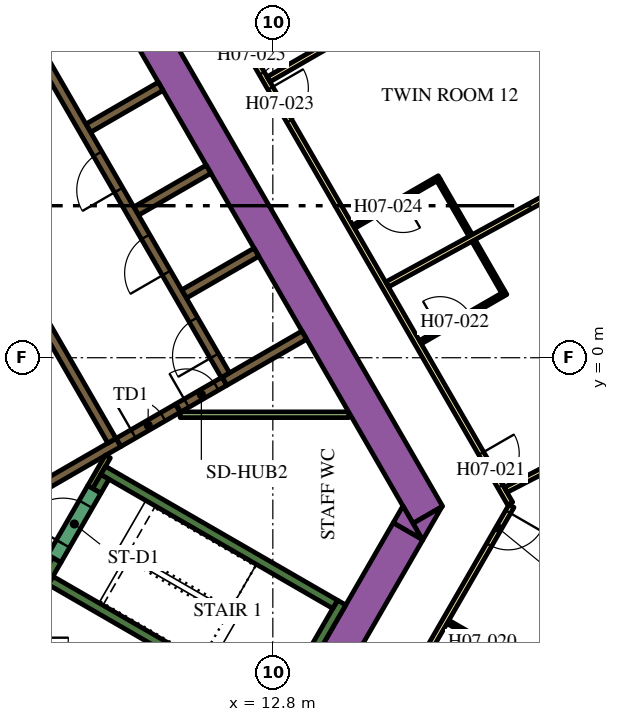
"""IFC4 building model, lengths in metres.
Left out: names, types, materials, properties, quantities, classifications, styles, units other than length and angle.
Written with IfcOpenShell. Run it as: python <this file> out.ifc"""

import sys

from ifc_helpers import new_model, si_unit, direction, frame, frame_2d, origin, place, context, subcontext, project, spatial, polyline, rectangle, outline, extrude, element, fill, save


model = new_model("IFC4")
c1 = context("Model", 3, precision=1e-05, world=origin(), true_north=direction((0.0, 1.0)))
c2 = subcontext(c1, "Body", "Model", "MODEL_VIEW")
j1 = project(units=[si_unit("LENGTHUNIT", "METRE"), si_unit("PLANEANGLEUNIT", "RADIAN")], contexts=[c1])
p1 = place(None, origin())
s1 = spatial("IfcSite", under=j1, at=p1, CompositionType="ELEMENT")
p2 = place(p1, origin())
s2 = spatial("IfcBuilding", under=s1, at=p2, CompositionType="ELEMENT")
p3 = place(p2, frame((0.0, 0.0, 99.3)))
s3 = spatial("IfcBuildingStorey", under=s2, at=p3, CompositionType="ELEMENT", Elevation=99.3)
p4 = place(p3, frame((6.776, 13.364, 0.0), z_axis=(0.0, 0.0, 1.0), x_axis=(0.500004177138, -0.8660229921, 0.0)))
e1 = element("IfcWall", 1, at=p4, inside=s3, PredefinedType="SOLIDWALL", context=c2, shape_type="SweptSolid", body=[
    extrude(rectangle(XDim=20.204, YDim=0.9, at=frame_2d((10.102, 0.0))), origin(), (0.0, 0.0, 1.0), 3.9),
])
p5 = place(p3, origin())
e2 = element("IfcWall", 2, at=p5, inside=s3, PredefinedType="SOLIDWALL", context=c2, shape_type="SweptSolid", body=[
    extrude(outline(polyline([(16.743, -4.8), (16.489, -4.36), (17.251, -3.92), (16.743, -4.8)])), origin(), (0.0, 0.0, 1.0), 3.9),
])
p6 = place(p3, frame((11.695, -12.644, 0.0), z_axis=(0.0, 0.0, 1.0), x_axis=(0.500010229568, 0.86601949766, 0.0)))
e3 = element("IfcWall", 3, at=p6, inside=s3, PredefinedType="SOLIDWALL", context=c2, shape_type="SweptSolid", body=[
    extrude(rectangle(XDim=9.326, YDim=0.9, at=frame_2d((4.663, 0.0))), origin(), (0.0, 0.0, 1.0), 3.9),
])
e4 = element("IfcWall", 4, at=p5, inside=s3, PredefinedType="SOLIDWALL", context=c2, shape_type="SweptSolid", body=[
    extrude(outline(polyline([(16.223, -3.9), (16.732, -4.78), (15.969, -4.34), (16.223, -3.9)])), origin(), (0.0, 0.0, 1.0), 3.9),
])
p7 = place(p3, frame((12.885, -9.431, 0.0), z_axis=(0.0, 0.0, 1.0), x_axis=(0.500020560727, 0.866013532718, 0.0)))
e5 = element("IfcWall", 5, at=p7, inside=s3, PredefinedType="SOLIDWALL", context=c2, shape_type="SweptSolid", body=[
    extrude(rectangle(XDim=3.45, YDim=0.25, at=frame_2d((1.725, 0.0))), origin(), (0.0, 0.0, 1.0), 3.9),
])
p8 = place(p3, frame((12.84, -9.261, 0.0), z_axis=(0.0, 0.0, 1.0), x_axis=(-0.866013990052, 0.500019768644, 0.0)))
e6 = element("IfcWall", 6, at=p8, inside=s3, PredefinedType="SOLIDWALL", context=c2, shape_type="SweptSolid", body=[
    extrude(rectangle(XDim=6.8, YDim=0.25, at=frame_2d((3.4, 0.0))), origin(), (0.0, 0.0, 1.0), 3.9),
])
p9 = place(p3, frame((6.78, -5.906, 0.0), z_axis=(0.0, 0.0, 1.0), x_axis=(0.500223362819, 0.865896406789, 0.0)))
e7 = element("IfcWall", 7, at=p9, inside=s3, PredefinedType="SOLIDWALL", context=c2, shape_type="SweptSolid", body=[
    extrude(rectangle(XDim=0.675, YDim=0.25, at=frame_2d((0.337, 0.0))), origin(), (0.0, 0.0, 1.0), 3.9),
])
p10 = place(p3, frame((8.334, -2.964, 0.0), z_axis=(0.0, 0.0, 1.0), x_axis=(0.866016039709, -0.500016218704, 0.0)))
e8 = element("IfcWall", 8, at=p10, inside=s3, PredefinedType="SOLIDWALL", context=c2, shape_type="SweptSolid", body=[
    extrude(rectangle(XDim=7.05, YDim=0.25, at=frame_2d((3.525, 0.0))), origin(), (0.0, 0.0, 1.0), 3.9),
])
p11 = place(p3, frame((8.168, -3.503, 0.0), z_axis=(0.0, 0.0, 1.0), x_axis=(0.49972245349, 0.866185586049, 0.0)))
e9 = element("IfcWall", 9, at=p11, inside=s3, PredefinedType="SOLIDWALL", context=c2, shape_type="SweptSolid", body=[
    extrude(rectangle(XDim=0.425, YDim=0.25, at=frame_2d((0.212, 0.0))), origin(), (0.0, 0.0, 1.0), 3.9),
])
p12 = place(p3, frame((10.464, 1.677, 0.0), z_axis=(0.0, 0.0, 1.0), x_axis=(0.86605622881, 0.499946605688, 0.0)))
e10 = element("IfcWall", 10, at=p12, inside=s3, PredefinedType="SOLIDWALL", context=c2, shape_type="SweptSolid", body=[
    extrude(rectangle(XDim=2.2, YDim=0.25, at=frame_2d((1.1, 0.0))), origin(), (0.0, 0.0, 1.0), 3.9),
])
p13 = place(p3, frame((13.629, 0.594, 0.0), z_axis=(0.0, 0.0, 1.0), x_axis=(-0.866063384774, -0.499934209226, 0.0)))
e11 = element("IfcWall", 11, at=p13, inside=s3, PredefinedType="SOLIDWALL", context=c2, shape_type="SweptSolid", body=[
    extrude(rectangle(XDim=2.428, YDim=0.25, at=frame_2d((1.214, 0.0))), origin(), (0.0, 0.0, 1.0), 3.9),
])
p14 = place(p3, frame((6.614, -3.456, 0.0), z_axis=(0.0, 0.0, 1.0), x_axis=(0.866031582473, 0.499989298045, 0.0)))
e12 = element("IfcWall", 12, at=p14, inside=s3, PredefinedType="SOLIDWALL", context=c2, shape_type="SweptSolid", body=[
    extrude(rectangle(XDim=2.455, YDim=0.25, at=frame_2d((1.228, 0.0))), origin(), (0.0, 0.0, 1.0), 3.9),
])
for number, where, z_axis, x_axis in (
    (13, (7.944, 6.041, 0.0), (0.0, 0.0, 1.0), (0.866, 0.5, 0.0)),
    (14, (9.204, 3.859, 0.0), (0.0, 0.0, 1.0), (0.866, 0.5, 0.0)),
):
    element("IfcWall", number, at=place(p3, frame(where, z_axis=z_axis, x_axis=x_axis)), inside=s3, PredefinedType="SOLIDWALL", context=c2, shape_type="SweptSolid", body=[
        extrude(rectangle(XDim=2.2, YDim=0.25, at=frame_2d((1.1, 0.0))), origin(), (0.0, 0.0, 1.0), 3.9),
    ])
p15 = place(p3, frame((6.945, -5.222, 0.0), z_axis=(0.0, 0.0, 1.0), x_axis=(-0.499818422106, -0.866130212453, 0.0)))
e15 = element("IfcWall", 15, at=p15, inside=s3, PredefinedType="PARTITIONING", context=c2, shape_type="SweptSolid", body=[
    extrude(rectangle(XDim=0.514, YDim=0.15, at=frame_2d((0.257, 0.0))), origin(), (0.0, 0.0, 1.0), 2.75),
])
p16 = place(p3, frame((8.459, -2.599, 0.0), z_axis=(0.0, 0.0, 1.0), x_axis=(-0.500041054325, -0.866001699761, 0.0)))
e16 = element("IfcWall", 16, at=p16, inside=s3, PredefinedType="PARTITIONING", context=c2, shape_type="SweptSolid", body=[
    extrude(rectangle(XDim=0.929, YDim=0.15, at=frame_2d((0.464, 0.0))), origin(), (0.0, 0.0, 1.0), 3.9),
])
p17 = place(p3, frame((10.362, -1.5, 0.0), z_axis=(0.0, 0.0, 1.0), x_axis=(1.0, 0.0, 0.0)))
e17 = element("IfcWall", 17, at=p17, inside=s3, PredefinedType="PARTITIONING", context=c2, shape_type="SweptSolid", body=[
    extrude(rectangle(XDim=4.439, YDim=0.15, at=frame_2d((2.22, 0.0))), origin(), (0.0, 0.0, 1.0), 2.75),
])
p18 = place(p3, frame((11.553, -0.46, 0.0), z_axis=(0.0, 0.0, 1.0), x_axis=(-0.500006514828, 0.866021642414, 0.0)))
e18 = element("IfcWall", 18, at=p18, inside=s3, PredefinedType="SOLIDWALL", context=c2, shape_type="SweptSolid", body=[
    extrude(rectangle(XDim=12.35, YDim=0.25, at=frame_2d((6.175, 0.0))), origin(), (0.0, 0.0, 1.0), 3.9),
])
p19 = place(p18, frame((0.585, 0.0, 0.0)))
e19 = element("IfcOpeningElement", 19, at=p19, cuts=e18, PredefinedType="OPENING", context=c2, shape_type="SweptSolid", body=[
    extrude(rectangle(XDim=1.1, YDim=2.1, at=frame_2d((0.55, 1.05))), frame((0.0, 0.135, 0.0), z_axis=(0.0, -1.0, 0.0), x_axis=(1.0, 0.0, 0.0)), (0.0, 0.0, 1.0), 0.27),
])
p20 = place(p18, frame((3.105, 0.0, 0.0)))
e20 = element("IfcOpeningElement", 20, at=p20, cuts=e18, PredefinedType="OPENING", context=c2, shape_type="SweptSolid", body=[
    extrude(rectangle(XDim=1.1, YDim=2.1, at=frame_2d((0.55, 1.05))), frame((0.0, 0.135, 0.0), z_axis=(0.0, -1.0, 0.0), x_axis=(1.0, 0.0, 0.0)), (0.0, 0.0, 1.0), 0.27),
])
p21 = place(p18, frame((5.625, 0.0, 0.0)))
e21 = element("IfcOpeningElement", 21, at=p21, cuts=e18, PredefinedType="OPENING", context=c2, shape_type="SweptSolid", body=[
    extrude(rectangle(XDim=1.1, YDim=2.1, at=frame_2d((0.55, 1.05))), frame((0.0, 0.135, 0.0), z_axis=(0.0, -1.0, 0.0), x_axis=(1.0, 0.0, 0.0)), (0.0, 0.0, 1.0), 0.27),
])
p22 = place(p3, frame((8.565, -2.185, 0.0), z_axis=(0.0, 0.0, 1.0), x_axis=(-0.499997954832, 0.866026584559, 0.0)))
e22 = element("IfcWall", 22, at=p22, inside=s3, PredefinedType="SOLIDWALL", context=c2, shape_type="SweptSolid", body=[
    extrude(rectangle(XDim=12.35, YDim=0.25, at=frame_2d((6.175, 0.0))), origin(), (0.0, 0.0, 1.0), 3.9),
])
p23 = place(p22, frame((5.725, 0.0, 0.0)))
e23 = element("IfcOpeningElement", 23, at=p23, cuts=e22, PredefinedType="OPENING", context=c2, shape_type="SweptSolid", body=[
    extrude(rectangle(XDim=0.9, YDim=2.1, at=frame_2d((0.45, 1.05))), frame((0.0, 0.135, 0.0), z_axis=(0.0, -1.0, 0.0), x_axis=(1.0, 0.0, 0.0)), (0.0, 0.0, 1.0), 0.27),
])
p24 = place(p3, frame((7.053, -5.284, 0.0), z_axis=(0.0, 0.0, 1.0), x_axis=(0.500078061341, 0.865980330357, 0.0)))
e24 = element("IfcWall", 24, at=p24, inside=s3, PredefinedType="SOLIDWALL", context=c2, shape_type="SweptSolid", body=[
    extrude(rectangle(XDim=2.1, YDim=0.4, at=frame_2d((1.05, 0.0))), origin(), (0.0, 0.0, 1.0), 3.9),
])
p25 = place(p24, frame((0.45, 0.0, 0.0)))
e25 = element("IfcOpeningElement", 25, at=p25, cuts=e24, PredefinedType="OPENING", context=c2, shape_type="SweptSolid", body=[
    extrude(rectangle(XDim=1.2, YDim=2.1, at=frame_2d((0.6, 1.05))), frame((0.0, 0.21, 0.0), z_axis=(0.0, -1.0, 0.0), x_axis=(1.0, 0.0, 0.0)), (0.0, 0.0, 1.0), 0.42),
])
p26 = place(p3, frame((8.74, -2.229, 0.0), z_axis=(0.0, 0.0, 1.0), x_axis=(0.865989075817, 0.500062916607, 0.0)))
e26 = element("IfcWall", 26, at=p26, inside=s3, PredefinedType="SOLIDWALL", context=c2, shape_type="SweptSolid", body=[
    extrude(rectangle(XDim=1.8, YDim=0.25, at=frame_2d((0.9, 0.0))), origin(), (0.0, 0.0, 1.0), 3.9),
])
p27 = place(p26, frame((0.45, 0.0, 0.0)))
e27 = element("IfcOpeningElement", 27, at=p27, cuts=e26, PredefinedType="OPENING", context=c2, shape_type="SweptSolid", body=[
    extrude(rectangle(XDim=0.9, YDim=2.1, at=frame_2d((0.45, 1.05))), frame((0.0, 0.135, 0.0), z_axis=(0.0, -1.0, 0.0), x_axis=(1.0, 0.0, 0.0)), (0.0, 0.0, 1.0), 0.27),
])
p28 = place(p3, frame((10.313, -1.32, 0.0), z_axis=(0.0, 0.0, 1.0), x_axis=(0.866034573852, 0.49998411664, 0.0)))
e28 = element("IfcWall", 28, at=p28, inside=s3, PredefinedType="SOLIDWALL", context=c2, shape_type="SweptSolid", body=[
    extrude(rectangle(XDim=1.4, YDim=0.25, at=frame_2d((0.7, 0.0))), origin(), (0.0, 0.0, 1.0), 3.9),
])
p29 = place(p28, frame((0.25, 0.0, 0.0)))
e29 = element("IfcOpeningElement", 29, at=p29, cuts=e28, PredefinedType="OPENING", context=c2, shape_type="SweptSolid", body=[
    extrude(rectangle(XDim=0.9, YDim=2.1, at=frame_2d((0.45, 1.05))), frame((0.0, 0.135, 0.0), z_axis=(0.0, -1.0, 0.0), x_axis=(1.0, 0.0, 0.0)), (0.0, 0.0, 1.0), 0.27),
])
p30 = place(p3, frame((19.081, -3.9, 0.0), z_axis=(0.0, 0.0, 1.0), x_axis=(-0.499974327079, -0.866040225545, 0.0)))
e30 = element("IfcWall", 30, at=p30, inside=s3, PredefinedType="PARTITIONING", context=c2, shape_type="SweptSolid", body=[
    extrude(rectangle(XDim=5.258, YDim=0.15, at=frame_2d((2.629, 0.0))), origin(), (0.0, 0.0, 1.0), 2.75),
])
p31 = place(p30, frame((0.18, 0.0, 0.0)))
e31 = element("IfcOpeningElement", 31, at=p31, cuts=e30, PredefinedType="OPENING", context=c2, shape_type="SweptSolid", body=[
    extrude(rectangle(XDim=1.0, YDim=2.1, at=frame_2d((0.5, 1.05))), frame((0.0, 0.085, 0.0), z_axis=(0.0, -1.0, 0.0), x_axis=(1.0, 0.0, 0.0)), (0.0, 0.0, 1.0), 0.17),
])
p32 = place(p3, frame((6.163, 18.475, 0.0), z_axis=(0.0, 0.0, 1.0), x_axis=(0.500001317485, -0.866024643133, 0.0)))
e32 = element("IfcWall", 32, at=p32, inside=s3, PredefinedType="PARTITIONING", context=c2, shape_type="SweptSolid", body=[
    extrude(rectangle(XDim=25.767, YDim=0.15, at=frame_2d((12.883, 0.0))), origin(), (0.0, 0.0, 1.0), 2.75),
])
p33 = place(p32, frame((24.241, 0.0, 0.0)))
e33 = element("IfcOpeningElement", 33, at=p33, cuts=e32, PredefinedType="OPENING", context=c2, shape_type="SweptSolid", body=[
    extrude(rectangle(XDim=1.0, YDim=2.1, at=frame_2d((0.5, 1.05))), frame((0.0, 0.085, 0.0), z_axis=(0.0, -1.0, 0.0), x_axis=(1.0, 0.0, 0.0)), (0.0, 0.0, 1.0), 0.17),
])
p34 = place(p32, frame((13.144, 0.0, 0.0)))
e34 = element("IfcOpeningElement", 34, at=p34, cuts=e32, PredefinedType="OPENING", context=c2, shape_type="SweptSolid", body=[
    extrude(rectangle(XDim=1.0, YDim=2.1, at=frame_2d((0.5, 1.05))), frame((0.0, 0.085, 0.0), z_axis=(0.0, -1.0, 0.0), x_axis=(1.0, 0.0, 0.0)), (0.0, 0.0, 1.0), 0.17),
])
p35 = place(p32, frame((11.592, 0.0, 0.0)))
e35 = element("IfcOpeningElement", 35, at=p35, cuts=e32, PredefinedType="OPENING", context=c2, shape_type="SweptSolid", body=[
    extrude(rectangle(XDim=1.1, YDim=2.1, at=frame_2d((0.55, 1.05))), frame((0.0, 0.085, 0.0), z_axis=(0.0, -1.0, 0.0), x_axis=(1.0, 0.0, 0.0)), (0.0, 0.0, 1.0), 0.17),
])
p36 = place(p32, frame((4.674, 0.0, 0.0)))
e36 = element("IfcOpeningElement", 36, at=p36, cuts=e32, PredefinedType="OPENING", context=c2, shape_type="SweptSolid", body=[
    extrude(rectangle(XDim=0.9, YDim=2.1, at=frame_2d((0.45, 1.05))), frame((0.0, 0.085, 0.0), z_axis=(0.0, -1.0, 0.0), x_axis=(1.0, 0.0, 0.0)), (0.0, 0.0, 1.0), 0.17),
])
p37 = place(p32, frame((2.411, 0.0, 0.0)))
e37 = element("IfcOpeningElement", 37, at=p37, cuts=e32, PredefinedType="OPENING", context=c2, shape_type="SweptSolid", body=[
    extrude(rectangle(XDim=1.0, YDim=2.1, at=frame_2d((0.5, 1.05))), frame((0.0, 0.085, 0.0), z_axis=(0.0, -1.0, 0.0), x_axis=(1.0, 0.0, 0.0)), (0.0, 0.0, 1.0), 0.17),
])
p38 = place(p3, frame((18.484, 10.672, 0.0), z_axis=(0.0, 0.0, 1.0), x_axis=(-0.866019162053, -0.50001081084, 0.0)))
e38 = element("IfcWall", 38, at=p38, inside=s3, PredefinedType="PARTITIONING", context=c2, shape_type="SweptSolid", body=[
    extrude(rectangle(XDim=6.694, YDim=0.15, at=frame_2d((3.347, 0.0))), origin(), (0.0, 0.0, 1.0), 2.75),
])
p39 = place(p3, frame((21.614, 5.102, 0.0), z_axis=(0.0, 0.0, 1.0), x_axis=(-0.877484555087, -0.479604895287, 0.0)))
e39 = element("IfcWall", 39, at=p39, inside=s3, PredefinedType="PARTITIONING", context=c2, shape_type="SweptSolid", body=[
    extrude(rectangle(XDim=6.611, YDim=0.15, at=frame_2d((3.306, 0.0))), origin(), (0.0, 0.0, 1.0), 2.75),
])
p40 = place(p3, frame((24.613, -0.541, 0.0), z_axis=(0.0, 0.0, 1.0), x_axis=(-0.888459912519, -0.458954228487, 0.0)))
e40 = element("IfcWall", 40, at=p40, inside=s3, PredefinedType="PARTITIONING", context=c2, shape_type="SweptSolid", body=[
    extrude(rectangle(XDim=6.392, YDim=0.15, at=frame_2d((3.196, 0.0))), origin(), (0.0, 0.0, 1.0), 2.75),
])
p41 = place(p3, frame((27.479, -6.251, 0.0), z_axis=(0.0, 0.0, 1.0), x_axis=(-0.898945877276, -0.438059710231, 0.0)))
e41 = element("IfcWall", 41, at=p41, inside=s3, PredefinedType="PARTITIONING", context=c2, shape_type="SweptSolid", body=[
    extrude(rectangle(XDim=8.909, YDim=0.15, at=frame_2d((4.455, 0.0))), origin(), (0.0, 0.0, 1.0), 2.75),
])
p42 = place(p3, frame((19.659, -8.25, 0.0), z_axis=(0.0, 0.0, 1.0), x_axis=(-0.866021400173, 0.500006934395, 0.0)))
e42 = element("IfcWall", 42, at=p42, inside=s3, PredefinedType="PARTITIONING", context=c2, shape_type="SweptSolid", body=[
    extrude(rectangle(XDim=2.6, YDim=0.1, at=frame_2d((1.3, 0.0))), origin(), (0.0, 0.0, 1.0), 2.75),
])
p43 = place(p42, frame((1.1, 0.0, 0.0)))
e43 = element("IfcOpeningElement", 43, at=p43, cuts=e42, PredefinedType="OPENING", context=c2, shape_type="SweptSolid", body=[
    extrude(rectangle(XDim=0.9, YDim=2.1, at=frame_2d((0.45, 1.05))), frame((0.0, 0.06, 0.0), z_axis=(0.0, -1.0, 0.0), x_axis=(1.0, 0.0, 0.0)), (0.0, 0.0, 1.0), 0.12),
])
p44 = place(p3, frame((16.681, 0.407, 0.0), z_axis=(0.0, 0.0, 1.0), x_axis=(0.866021400173, 0.500006934395, 0.0)))
e44 = element("IfcWall", 44, at=p44, inside=s3, PredefinedType="PARTITIONING", context=c2, shape_type="SweptSolid", body=[
    extrude(rectangle(XDim=2.6, YDim=0.1, at=frame_2d((1.3, 0.0))), origin(), (0.0, 0.0, 1.0), 2.75),
])
p45 = place(p44, frame((0.6, 0.0, 0.0)))
e45 = element("IfcOpeningElement", 45, at=p45, cuts=e44, PredefinedType="OPENING", context=c2, shape_type="SweptSolid", body=[
    extrude(rectangle(XDim=0.9, YDim=2.1, at=frame_2d((0.45, 1.05))), frame((0.0, 0.06, 0.0), z_axis=(0.0, -1.0, 0.0), x_axis=(1.0, 0.0, 0.0)), (0.0, 0.0, 1.0), 0.12),
])
p46 = place(p3, frame((18.86, 1.734, 0.0), z_axis=(0.0, 0.0, 1.0), x_axis=(-0.500017819788, 0.86601511528, 0.0)))
e46 = element("IfcWall", 46, at=p46, inside=s3, PredefinedType="PARTITIONING", context=c2, shape_type="SweptSolid", body=[
    extrude(rectangle(XDim=1.55, YDim=0.1, at=frame_2d((0.775, 0.0))), origin(), (0.0, 0.0, 1.0), 2.75),
])
p47 = place(p3, frame((17.179, 4.745, 0.0), z_axis=(0.0, 0.0, 1.0), x_axis=(-0.866021400173, -0.500006934395, 0.0)))
e47 = element("IfcWall", 47, at=p47, inside=s3, PredefinedType="PARTITIONING", context=c2, shape_type="SweptSolid", body=[
    extrude(rectangle(XDim=2.6, YDim=0.1, at=frame_2d((1.3, 0.0))), origin(), (0.0, 0.0, 1.0), 2.75),
])
p48 = place(p47, frame((1.1, 0.0, 0.0)))
e48 = element("IfcOpeningElement", 48, at=p48, cuts=e47, PredefinedType="OPENING", context=c2, shape_type="SweptSolid", body=[
    extrude(rectangle(XDim=0.9, YDim=2.1, at=frame_2d((0.45, 1.05))), frame((0.0, 0.06, 0.0), z_axis=(0.0, -1.0, 0.0), x_axis=(1.0, 0.0, 0.0)), (0.0, 0.0, 1.0), 0.12),
])
p49 = place(p3, frame((17.161, 4.677, 0.0), z_axis=(0.0, 0.0, 1.0), x_axis=(0.499890179513, -0.866088799389, 0.0)))
e49 = element("IfcWall", 49, at=p49, inside=s3, PredefinedType="PARTITIONING", context=c2, shape_type="SweptSolid", body=[
    extrude(rectangle(XDim=1.68, YDim=0.1, at=frame_2d((0.84, 0.0))), origin(), (0.0, 0.0, 1.0), 2.75),
])
p50 = place(p3, frame((21.956, 6.033, 0.0), z_axis=(0.0, 0.0, 1.0), x_axis=(-0.48983164787, 0.87181704316, 0.0)))
e50 = element("IfcWall", 50, at=p50, inside=s3, PredefinedType="SOLIDWALL", context=c2, shape_type="SweptSolid", body=[
    extrude(rectangle(XDim=5.1, YDim=0.29, at=frame_2d((2.55, 0.0))), origin(), (0.0, 0.0, 1.0), 3.65),
])
p51 = place(p50, frame((0.273, 0.0, 0.9)))
e51 = element("IfcOpeningElement", 51, at=p51, cuts=e50, PredefinedType="OPENING", context=c2, shape_type="SweptSolid", body=[
    extrude(rectangle(XDim=1.35, YDim=2.15, at=frame_2d((0.675, 1.075))), frame((0.0, 0.155, 0.0), z_axis=(0.0, -1.0, 0.0), x_axis=(1.0, 0.0, 0.0)), (0.0, 0.0, 1.0), 0.31),
])
p52 = place(p50, frame((3.478, 0.0, 0.9)))
e52 = element("IfcOpeningElement", 52, at=p52, cuts=e50, PredefinedType="OPENING", context=c2, shape_type="SweptSolid", body=[
    extrude(rectangle(XDim=1.35, YDim=2.15, at=frame_2d((0.675, 1.075))), frame((0.0, 0.155, 0.0), z_axis=(0.0, -1.0, 0.0), x_axis=(1.0, 0.0, 0.0)), (0.0, 0.0, 1.0), 0.31),
])
p53 = place(p19, origin())
e53 = element("IfcDoor", 53, at=p53, inside=s3, OperationType="DOUBLE_DOOR_SLIDING", PredefinedType="DOOR", context=c2, shape_type="SweptSolid", body=[
    extrude(rectangle(XDim=1.1, YDim=2.1, at=frame_2d((0.55, 1.05))), frame((0.0, 0.025, 0.0), z_axis=(0.0, -1.0, 0.0), x_axis=(1.0, 0.0, 0.0)), (0.0, 0.0, 1.0), 0.05),
])
fill(e19, e53)
p54 = place(p20, origin())
e54 = element("IfcDoor", 54, at=p54, inside=s3, OperationType="DOUBLE_DOOR_SLIDING", PredefinedType="DOOR", context=c2, shape_type="SweptSolid", body=[
    extrude(rectangle(XDim=1.1, YDim=2.1, at=frame_2d((0.55, 1.05))), frame((0.0, 0.025, 0.0), z_axis=(0.0, -1.0, 0.0), x_axis=(1.0, 0.0, 0.0)), (0.0, 0.0, 1.0), 0.05),
])
fill(e20, e54)
p55 = place(p21, origin())
e55 = element("IfcDoor", 55, at=p55, inside=s3, OperationType="DOUBLE_DOOR_SLIDING", PredefinedType="DOOR", context=c2, shape_type="SweptSolid", body=[
    extrude(rectangle(XDim=1.1, YDim=2.1, at=frame_2d((0.55, 1.05))), frame((0.0, 0.025, 0.0), z_axis=(0.0, -1.0, 0.0), x_axis=(1.0, 0.0, 0.0)), (0.0, 0.0, 1.0), 0.05),
])
fill(e21, e55)
p56 = place(p25, origin())
e56 = element("IfcDoor", 56, at=p56, inside=s3, OperationType="SINGLE_SWING_LEFT", PredefinedType="DOOR", context=c2, shape_type="SweptSolid", body=[
    extrude(rectangle(XDim=1.2, YDim=2.1, at=frame_2d((0.6, 1.05))), frame((0.0, 0.025, 0.0), z_axis=(0.0, -1.0, 0.0), x_axis=(1.0, 0.0, 0.0)), (0.0, 0.0, 1.0), 0.05),
])
fill(e25, e56)
p57 = place(p27, origin())
e57 = element("IfcDoor", 57, at=p57, inside=s3, OperationType="SINGLE_SWING_LEFT", PredefinedType="DOOR", context=c2, shape_type="SweptSolid", body=[
    extrude(rectangle(XDim=0.9, YDim=2.1, at=frame_2d((0.45, 1.05))), frame((0.0, 0.025, 0.0), z_axis=(0.0, -1.0, 0.0), x_axis=(1.0, 0.0, 0.0)), (0.0, 0.0, 1.0), 0.05),
])
fill(e27, e57)
p58 = place(p29, origin())
e58 = element("IfcDoor", 58, at=p58, inside=s3, OperationType="SINGLE_SWING_LEFT", PredefinedType="DOOR", context=c2, shape_type="SweptSolid", body=[
    extrude(rectangle(XDim=0.9, YDim=2.1, at=frame_2d((0.45, 1.05))), frame((0.0, 0.025, 0.0), z_axis=(0.0, -1.0, 0.0), x_axis=(1.0, 0.0, 0.0)), (0.0, 0.0, 1.0), 0.05),
])
fill(e29, e58)
p59 = place(p31, origin())
e59 = element("IfcDoor", 59, at=p59, inside=s3, OperationType="SINGLE_SWING_LEFT", PredefinedType="DOOR", context=c2, shape_type="SweptSolid", body=[
    extrude(rectangle(XDim=1.0, YDim=2.1, at=frame_2d((0.5, 1.05))), frame((0.0, 0.025, 0.0), z_axis=(0.0, -1.0, 0.0), x_axis=(1.0, 0.0, 0.0)), (0.0, 0.0, 1.0), 0.05),
])
fill(e31, e59)
p60 = place(p43, origin())
e60 = element("IfcDoor", 60, at=p60, inside=s3, OperationType="SINGLE_SWING_LEFT", PredefinedType="DOOR", context=c2, shape_type="SweptSolid", body=[
    extrude(rectangle(XDim=0.9, YDim=2.1, at=frame_2d((0.45, 1.05))), frame((0.0, 0.025, 0.0), z_axis=(0.0, -1.0, 0.0), x_axis=(1.0, 0.0, 0.0)), (0.0, 0.0, 1.0), 0.05),
])
fill(e43, e60)
p61 = place(p33, origin())
e61 = element("IfcDoor", 61, at=p61, inside=s3, OperationType="SINGLE_SWING_RIGHT", PredefinedType="DOOR", context=c2, shape_type="SweptSolid", body=[
    extrude(rectangle(XDim=1.0, YDim=2.1, at=frame_2d((0.5, 1.05))), frame((0.0, 0.025, 0.0), z_axis=(0.0, -1.0, 0.0), x_axis=(1.0, 0.0, 0.0)), (0.0, 0.0, 1.0), 0.05),
])
fill(e33, e61)
p62 = place(p45, origin())
e62 = element("IfcDoor", 62, at=p62, inside=s3, OperationType="SINGLE_SWING_LEFT", PredefinedType="DOOR", context=c2, shape_type="SweptSolid", body=[
    extrude(rectangle(XDim=0.9, YDim=2.1, at=frame_2d((0.45, 1.05))), frame((0.0, 0.025, 0.0), z_axis=(0.0, -1.0, 0.0), x_axis=(1.0, 0.0, 0.0)), (0.0, 0.0, 1.0), 0.05),
])
fill(e45, e62)
p63 = place(p34, origin())
e63 = element("IfcDoor", 63, at=p63, inside=s3, OperationType="SINGLE_SWING_LEFT", PredefinedType="DOOR", context=c2, shape_type="SweptSolid", body=[
    extrude(rectangle(XDim=1.0, YDim=2.1, at=frame_2d((0.5, 1.05))), frame((0.0, 0.025, 0.0), z_axis=(0.0, -1.0, 0.0), x_axis=(1.0, 0.0, 0.0)), (0.0, 0.0, 1.0), 0.05),
])
fill(e34, e63)
p64 = place(p48, origin())
e64 = element("IfcDoor", 64, at=p64, inside=s3, OperationType="SINGLE_SWING_RIGHT", PredefinedType="DOOR", context=c2, shape_type="SweptSolid", body=[
    extrude(rectangle(XDim=0.9, YDim=2.1, at=frame_2d((0.45, 1.05))), frame((0.0, 0.025, 0.0), z_axis=(0.0, -1.0, 0.0), x_axis=(1.0, 0.0, 0.0)), (0.0, 0.0, 1.0), 0.05),
])
fill(e48, e64)
p65 = place(p35, origin())
e65 = element("IfcDoor", 65, at=p65, inside=s3, OperationType="SINGLE_SWING_RIGHT", PredefinedType="DOOR", context=c2, shape_type="SweptSolid", body=[
    extrude(rectangle(XDim=1.1, YDim=2.1, at=frame_2d((0.55, 1.05))), frame((0.0, 0.025, 0.0), z_axis=(0.0, -1.0, 0.0), x_axis=(1.0, 0.0, 0.0)), (0.0, 0.0, 1.0), 0.05),
])
fill(e35, e65)
save(model, sys.argv[1])
